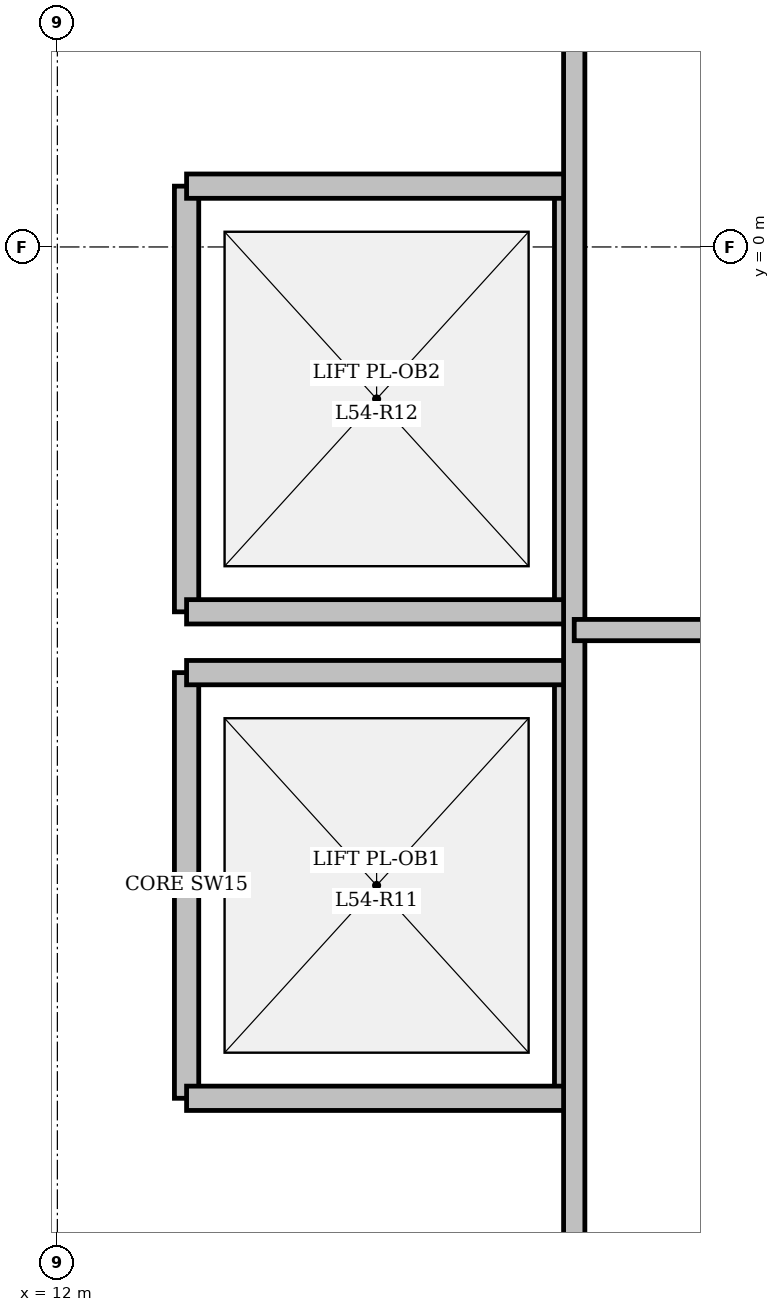
"""IFC4 building model, lengths in metres.
Left out: names, types, materials, properties, quantities, classifications, styles, units other than length and angle.
Written with IfcOpenShell. Run it as: python <this file> out.ifc"""

import sys

from ifc_helpers import new_model, si_unit, direction, frame, frame_2d, origin, place, context, subcontext, project, spatial, rectangle, extrude, element, save


model = new_model("IFC4")
c1 = context("Model", 3, precision=1e-05, world=origin(), true_north=direction((0.0, 1.0)))
c2 = subcontext(c1, "Body", "Model", "MODEL_VIEW")
j1 = project(units=[si_unit("LENGTHUNIT", "METRE"), si_unit("PLANEANGLEUNIT", "RADIAN")], contexts=[c1])
p1 = place(None, origin())
s1 = spatial("IfcSite", under=j1, at=p1, CompositionType="ELEMENT")
p2 = place(p1, origin())
s2 = spatial("IfcBuilding", under=s1, at=p2, CompositionType="ELEMENT")
p3 = place(p2, frame((0.0, 0.0, 190.25)))
s3 = spatial("IfcBuildingStorey", under=s2, at=p3, CompositionType="ELEMENT", Elevation=190.25)
for number, where, z_axis, x_axis in (
    (1, (12.85, -5.6, 0.0), (0.0, 0.0, 1.0), (0.0, 1.0, 0.0)),
    (2, (15.35, -5.6, 0.0), (0.0, 0.0, 1.0), (0.0, 1.0, 0.0)),
):
    element("IfcWall", number, at=place(p3, frame(where, z_axis=z_axis, x_axis=x_axis)), inside=s3, PredefinedType="SOLIDWALL", context=c2, shape_type="SweptSolid", body=[
        extrude(rectangle(XDim=2.8, YDim=0.16, at=frame_2d((1.4, 0.0))), origin(), (0.0, 0.0, 1.0), 3.1),
    ])
for number, where, z_axis, x_axis in (
    (3, (12.85, -5.6, 0.0), (0.0, 0.0, 1.0), (1.0, 0.0, 0.0)),
    (4, (12.85, -2.8, 0.0), (0.0, 0.0, 1.0), (1.0, 0.0, 0.0)),
):
    element("IfcWall", number, at=place(p3, frame(where, z_axis=z_axis, x_axis=x_axis)), inside=s3, PredefinedType="SOLIDWALL", context=c2, shape_type="SweptSolid", body=[
        extrude(rectangle(XDim=2.5, YDim=0.16, at=frame_2d((1.25, 0.0))), origin(), (0.0, 0.0, 1.0), 3.1),
    ])
for number, where, z_axis, x_axis in (
    (5, (12.85, -2.4, 0.0), (0.0, 0.0, 1.0), (0.0, 1.0, 0.0)),
    (6, (15.35, -2.4, 0.0), (0.0, 0.0, 1.0), (0.0, 1.0, 0.0)),
):
    element("IfcWall", number, at=place(p3, frame(where, z_axis=z_axis, x_axis=x_axis)), inside=s3, PredefinedType="SOLIDWALL", context=c2, shape_type="SweptSolid", body=[
        extrude(rectangle(XDim=2.8, YDim=0.16, at=frame_2d((1.4, 0.0))), origin(), (0.0, 0.0, 1.0), 3.1),
    ])
for number, where, z_axis, x_axis in (
    (7, (12.85, -2.4, 0.0), (0.0, 0.0, 1.0), (1.0, 0.0, 0.0)),
    (8, (12.85, 0.4, 0.0), (0.0, 0.0, 1.0), (1.0, 0.0, 0.0)),
):
    element("IfcWall", number, at=place(p3, frame(where, z_axis=z_axis, x_axis=x_axis)), inside=s3, PredefinedType="SOLIDWALL", context=c2, shape_type="SweptSolid", body=[
        extrude(rectangle(XDim=2.5, YDim=0.16, at=frame_2d((1.25, 0.0))), origin(), (0.0, 0.0, 1.0), 3.1),
    ])
p4 = place(p3, frame((15.4, -7.2, 0.0), z_axis=(0.0, 0.0, 1.0), x_axis=(0.0, 1.0, 0.0)))
e9 = element("IfcWall", 9, at=p4, inside=s3, PredefinedType="PARTITIONING", context=c2, shape_type="SweptSolid", body=[
    extrude(rectangle(XDim=10.45, YDim=0.14, at=frame_2d((5.225, 0.0))), origin(), (0.0, 0.0, 1.0), 3.1),
])
p5 = place(p4, frame((9.25, 0.0, 0.0)))
e10 = element("IfcOpeningElement", 10, at=p5, cuts=e9, PredefinedType="OPENING", context=c2, shape_type="SweptSolid", body=[
    extrude(rectangle(XDim=0.9, YDim=2.08, at=frame_2d((0.45, 1.04))), frame((0.0, 0.08, 0.0), z_axis=(0.0, -1.0, 0.0), x_axis=(1.0, 0.0, 0.0)), (0.0, 0.0, 1.0), 0.16),
])
p6 = place(p3, frame((15.4, -3.62, 0.0), z_axis=(0.0, 0.0, 1.0), x_axis=(1.0, 0.0, 0.0)))
e11 = element("IfcWall", 11, at=p6, inside=s3, PredefinedType="PARTITIONING", context=c2, shape_type="SweptSolid", body=[
    extrude(rectangle(XDim=3.05, YDim=0.14, at=frame_2d((1.525, 0.0))), origin(), (0.0, 0.0, 1.0), 3.1),
])
p7 = place(p6, frame((1.05, 0.0, 0.0)))
e12 = element("IfcOpeningElement", 12, at=p7, cuts=e11, PredefinedType="OPENING", context=c2, shape_type="SweptSolid", body=[
    extrude(rectangle(XDim=0.9, YDim=2.08, at=frame_2d((0.45, 1.04))), frame((0.0, 0.08, 0.0), z_axis=(0.0, -1.0, 0.0), x_axis=(1.0, 0.0, 0.0)), (0.0, 0.0, 1.0), 0.16),
])
p8 = place(p3, frame((11.52, -2.6, 0.0), z_axis=(0.0, 0.0, 1.0), x_axis=(1.0, 0.0, 0.0)))
e13 = element("IfcWall", 13, at=p8, inside=s3, PredefinedType="PARTITIONING", context=c2, shape_type="SweptSolid", body=[
    extrude(rectangle(XDim=1.33, YDim=0.14, at=frame_2d((0.665, 0.0))), origin(), (0.0, 0.0, 1.0), 3.1),
])
save(model, sys.argv[1])
